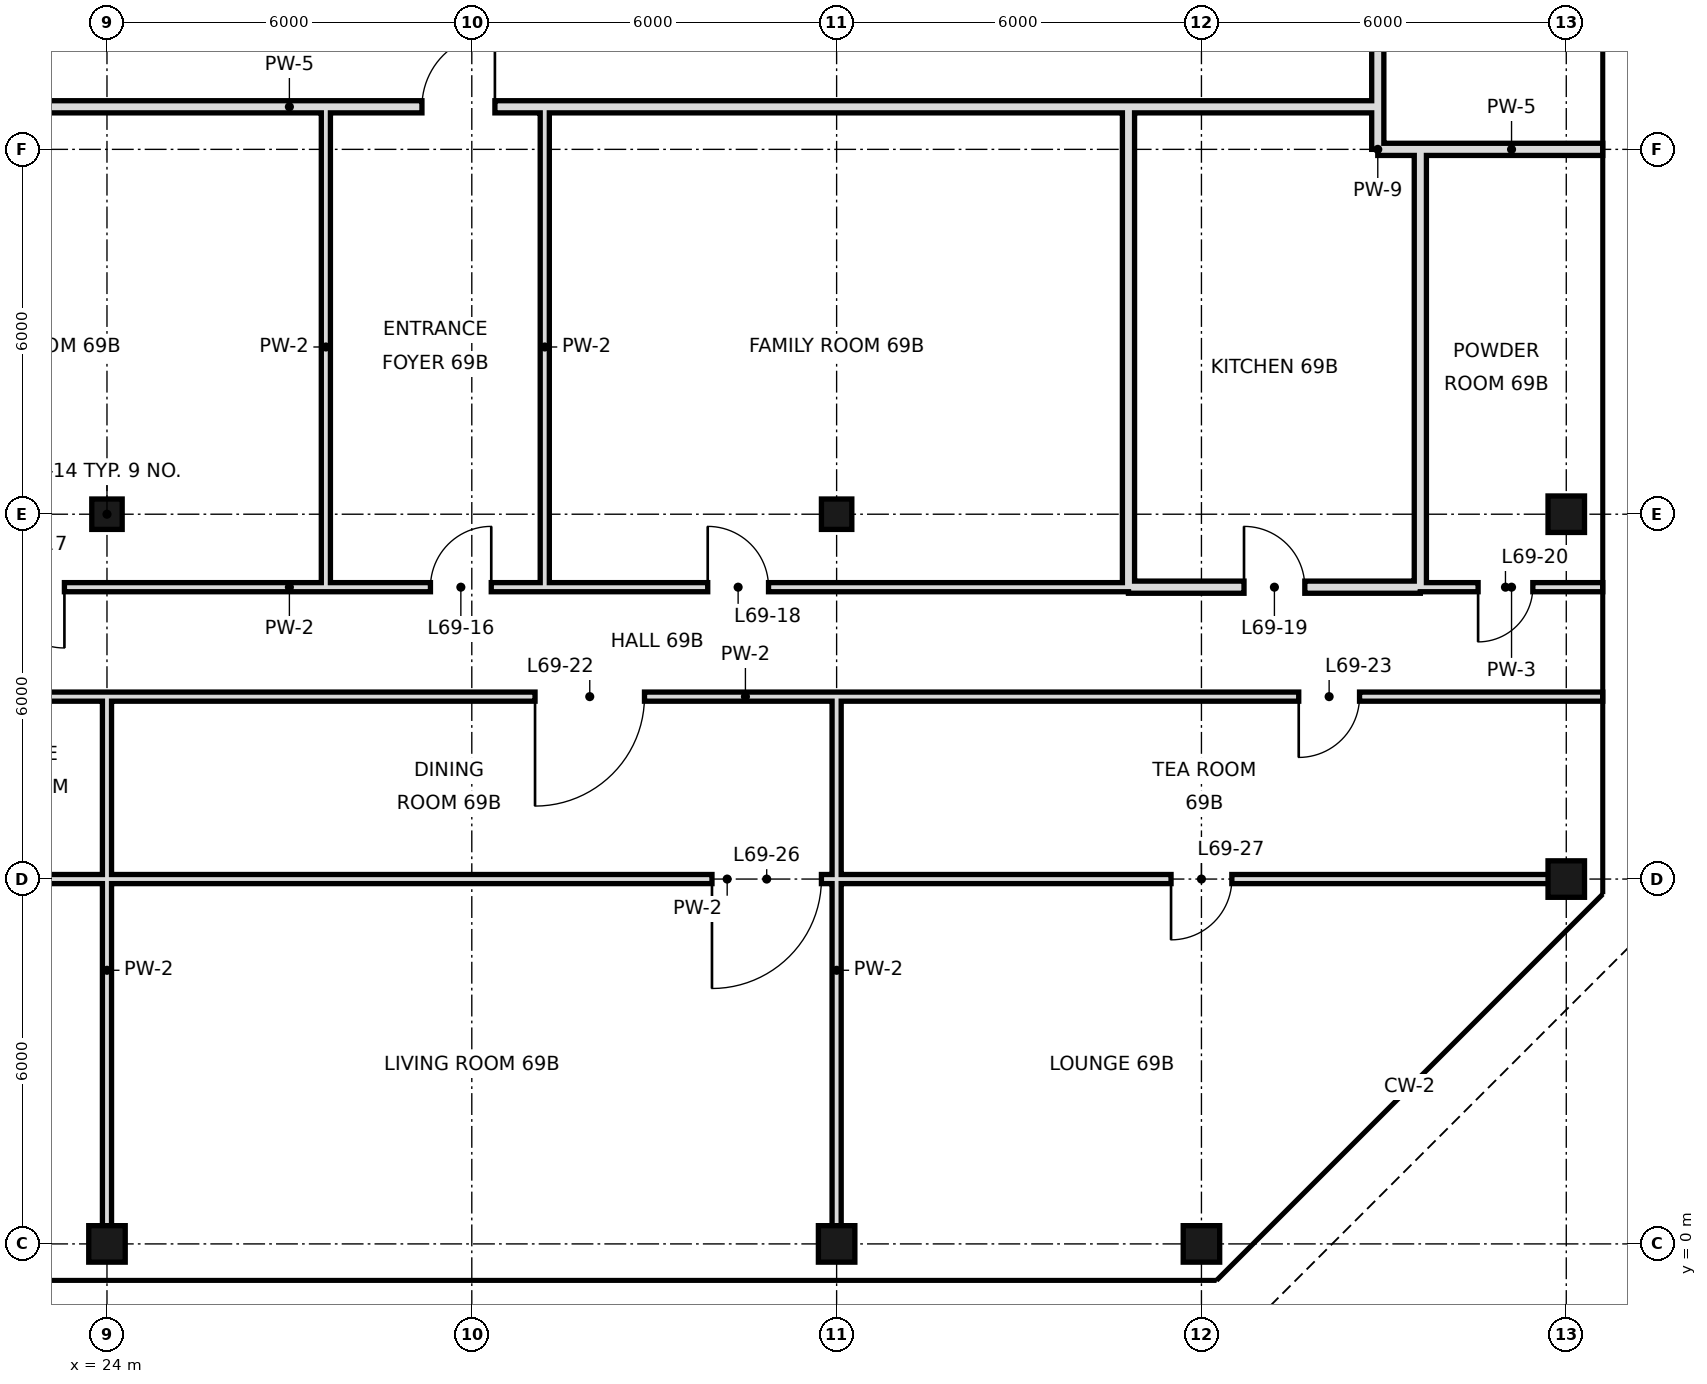
"""IFC4 building model, lengths in metres.
Left out: names, types, materials, properties, quantities, classifications, styles, units other than length and angle.
Written with IfcOpenShell. Run it as: python <this file> out.ifc"""

import sys

from ifc_helpers import new_model, si_unit, direction, frame, frame_2d, origin, origin_2d, place, context, subcontext, project, spatial, rectangle, hollow_rectangle, extrude, element, fill, save


model = new_model("IFC4")
c1 = context("Model", 3, precision=1e-05, world=origin(), true_north=direction((0.0, 1.0)))
c2 = subcontext(c1, "Body", "Model", "MODEL_VIEW")
j1 = project(units=[si_unit("LENGTHUNIT", "METRE"), si_unit("PLANEANGLEUNIT", "RADIAN")], contexts=[c1])
p1 = place(None, origin())
s1 = spatial("IfcSite", under=j1, at=p1, CompositionType="ELEMENT")
p2 = place(p1, origin())
s2 = spatial("IfcBuilding", under=s1, at=p2, CompositionType="ELEMENT")
p3 = place(p2, frame((0.0, 0.0, 294.4)))
s3 = spatial("IfcBuildingStorey", under=s2, at=p3, CompositionType="ELEMENT", Elevation=294.4)
p4 = place(p3, frame((24.0, 0.0, 0.0), z_axis=(0.0, 0.0, 1.0), x_axis=(1.0, 0.0, 0.0)))
e1 = element("IfcColumn", 1, at=p4, inside=s3, PredefinedType="COLUMN", context=c2, shape_type="SweptSolid", body=[
    extrude(hollow_rectangle(XDim=0.6, YDim=0.6, WallThickness=0.028, at=origin_2d()), origin(), (0.0, 0.0, 1.0), 3.6),
])
p5 = place(p3, frame((24.0, 12.0, 0.0), z_axis=(0.0, 0.0, 1.0), x_axis=(1.0, 0.0, 0.0)))
e2 = element("IfcColumn", 2, at=p5, inside=s3, PredefinedType="COLUMN", context=c2, shape_type="SweptSolid", body=[
    extrude(hollow_rectangle(XDim=0.5, YDim=0.5, WallThickness=0.025, at=origin_2d()), origin(), (0.0, 0.0, 1.0), 3.6),
])
p6 = place(p3, frame((36.0, 0.0, 0.0), z_axis=(0.0, 0.0, 1.0), x_axis=(1.0, 0.0, 0.0)))
e3 = element("IfcColumn", 3, at=p6, inside=s3, PredefinedType="COLUMN", context=c2, shape_type="SweptSolid", body=[
    extrude(hollow_rectangle(XDim=0.6, YDim=0.6, WallThickness=0.028, at=origin_2d()), origin(), (0.0, 0.0, 1.0), 3.6),
])
p7 = place(p3, frame((36.0, 12.0, 0.0), z_axis=(0.0, 0.0, 1.0), x_axis=(1.0, 0.0, 0.0)))
e4 = element("IfcColumn", 4, at=p7, inside=s3, PredefinedType="COLUMN", context=c2, shape_type="SweptSolid", body=[
    extrude(hollow_rectangle(XDim=0.5, YDim=0.5, WallThickness=0.025, at=origin_2d()), origin(), (0.0, 0.0, 1.0), 3.6),
])
for number, where, z_axis, x_axis in (
    (5, (42.0, 0.0, 0.0), (0.0, 0.0, 1.0), (1.0, 0.0, 0.0)),
    (6, (48.0, 6.0, 0.0), (0.0, 0.0, 1.0), (1.0, 0.0, 0.0)),
    (7, (48.0, 12.0, 0.0), (0.0, 0.0, 1.0), (1.0, 0.0, 0.0)),
):
    element("IfcColumn", number, at=place(p3, frame(where, z_axis=z_axis, x_axis=x_axis)), inside=s3, PredefinedType="COLUMN", context=c2, shape_type="SweptSolid", body=[
        extrude(hollow_rectangle(XDim=0.6, YDim=0.6, WallThickness=0.028, at=origin_2d()), origin(), (0.0, 0.0, 1.0), 3.6),
    ])
p8 = place(p3, frame((24.0, 0.0, 0.0), z_axis=(0.0, 0.0, 1.0), x_axis=(0.0, 1.0, 0.0)))
e8 = element("IfcWall", 8, at=p8, inside=s3, PredefinedType="PARTITIONING", context=c2, shape_type="SweptSolid", body=[
    extrude(rectangle(XDim=9.0, YDim=0.15, at=frame_2d((4.5, 0.0))), origin(), (0.0, 0.0, 1.0), 2.72),
])
for number, where, z_axis, x_axis in (
    (9, (27.6, 10.8, 0.0), (0.0, 0.0, 1.0), (0.0, 1.0, 0.0)),
    (10, (31.2, 10.8, 0.0), (0.0, 0.0, 1.0), (0.0, 1.0, 0.0)),
):
    element("IfcWall", number, at=place(p3, frame(where, z_axis=z_axis, x_axis=x_axis)), inside=s3, PredefinedType="PARTITIONING", context=c2, shape_type="SweptSolid", body=[
        extrude(rectangle(XDim=7.9, YDim=0.15, at=frame_2d((3.95, 0.0))), origin(), (0.0, 0.0, 1.0), 3.42),
    ])
p9 = place(p3, frame((36.0, 0.0, 0.0), z_axis=(0.0, 0.0, 1.0), x_axis=(0.0, 1.0, 0.0)))
e11 = element("IfcWall", 11, at=p9, inside=s3, PredefinedType="PARTITIONING", context=c2, shape_type="SweptSolid", body=[
    extrude(rectangle(XDim=9.0, YDim=0.15, at=frame_2d((4.5, 0.0))), origin(), (0.0, 0.0, 1.0), 2.72),
])
p10 = place(p3, frame((40.8, 10.8, 0.0), z_axis=(0.0, 0.0, 1.0), x_axis=(0.0, 1.0, 0.0)))
e12 = element("IfcWall", 12, at=p10, inside=s3, PredefinedType="SOLIDWALL", context=c2, shape_type="SweptSolid", body=[
    extrude(rectangle(XDim=7.9, YDim=0.2, at=frame_2d((3.95, 0.0))), origin(), (0.0, 0.0, 1.0), 2.72),
])
p11 = place(p3, frame((44.9, 18.7, 0.0), z_axis=(0.0, 0.0, 1.0), x_axis=(0.0, 1.0, 0.0)))
e13 = element("IfcWall", 13, at=p11, inside=s3, PredefinedType="SOLIDWALL", context=c2, shape_type="SweptSolid", body=[
    extrude(rectangle(XDim=27.249, YDim=0.2, at=frame_2d((13.625, 0.0))), origin(), (0.0, 0.0, 1.0), 2.97),
])
p12 = place(p11, frame((17.54, 0.0, 0.0)))
e14 = element("IfcOpeningElement", 14, at=p12, cuts=e13, PredefinedType="OPENING", context=c2, shape_type="SweptSolid", body=[
    extrude(rectangle(XDim=1.2, YDim=2.4, at=frame_2d((0.6, 1.2))), frame((0.0, 0.11, 0.0), z_axis=(0.0, -1.0, 0.0), x_axis=(1.0, 0.0, 0.0)), (0.0, 0.0, 1.0), 0.22),
])
p13 = place(p3, frame((44.9, 18.0, 0.0), z_axis=(0.0, 0.0, 1.0), x_axis=(0.0, 1.0, 0.0)))
e15 = element("IfcWall", 15, at=p13, inside=s3, PredefinedType="SOLIDWALL", context=c2, shape_type="SweptSolid", body=[
    extrude(rectangle(XDim=0.7, YDim=0.2, at=frame_2d((0.35, 0.0))), origin(), (0.0, 0.0, 1.0), 2.97),
])
p14 = place(p3, frame((45.6, 10.8, 0.0), z_axis=(0.0, 0.0, 1.0), x_axis=(0.0, 1.0, 0.0)))
e16 = element("IfcWall", 16, at=p14, inside=s3, PredefinedType="SOLIDWALL", context=c2, shape_type="SweptSolid", body=[
    extrude(rectangle(XDim=7.2, YDim=0.2, at=frame_2d((3.6, 0.0))), origin(), (0.0, 0.0, 1.0), 2.72),
])
p15 = place(p3, frame((40.8, 10.8, 0.0), z_axis=(0.0, 0.0, 1.0), x_axis=(1.0, 0.0, 0.0)))
e17 = element("IfcWall", 17, at=p15, inside=s3, PredefinedType="SOLIDWALL", context=c2, shape_type="SweptSolid", body=[
    extrude(rectangle(XDim=4.8, YDim=0.2, at=frame_2d((2.4, 0.0))), origin(), (0.0, 0.0, 1.0), 2.72),
])
p16 = place(p15, frame((1.9, 0.0, 0.0)))
e18 = element("IfcOpeningElement", 18, at=p16, cuts=e17, PredefinedType="OPENING", context=c2, shape_type="SweptSolid", body=[
    extrude(rectangle(XDim=1.0, YDim=2.4, at=frame_2d((0.5, 1.2))), frame((0.0, 0.11, 0.0), z_axis=(0.0, -1.0, 0.0), x_axis=(1.0, 0.0, 0.0)), (0.0, 0.0, 1.0), 0.22),
])
p17 = place(p3, frame((13.2, 10.8, 0.0), z_axis=(0.0, 0.0, 1.0), x_axis=(1.0, 0.0, 0.0)))
e19 = element("IfcWall", 19, at=p17, inside=s3, PredefinedType="PARTITIONING", context=c2, shape_type="SweptSolid", body=[
    extrude(rectangle(XDim=27.6, YDim=0.15, at=frame_2d((13.8, 0.0))), origin(), (0.0, 0.0, 1.0), 3.42),
])
p18 = place(p17, frame((2.56, 0.0, 0.0)))
e20 = element("IfcOpeningElement", 20, at=p18, cuts=e19, PredefinedType="OPENING", context=c2, shape_type="SweptSolid", body=[
    extrude(rectangle(XDim=1.0, YDim=2.4, at=frame_2d((0.5, 1.2))), frame((0.0, 0.085, 0.0), z_axis=(0.0, -1.0, 0.0), x_axis=(1.0, 0.0, 0.0)), (0.0, 0.0, 1.0), 0.17),
])
p19 = place(p17, frame((16.12, 0.0, 0.0)))
e21 = element("IfcOpeningElement", 21, at=p19, cuts=e19, PredefinedType="OPENING", context=c2, shape_type="SweptSolid", body=[
    extrude(rectangle(XDim=1.0, YDim=2.4, at=frame_2d((0.5, 1.2))), frame((0.0, 0.085, 0.0), z_axis=(0.0, -1.0, 0.0), x_axis=(1.0, 0.0, 0.0)), (0.0, 0.0, 1.0), 0.17),
])
p20 = place(p17, frame((9.1, 0.0, 0.0)))
e22 = element("IfcOpeningElement", 22, at=p20, cuts=e19, PredefinedType="OPENING", context=c2, shape_type="SweptSolid", body=[
    extrude(rectangle(XDim=1.0, YDim=2.4, at=frame_2d((0.5, 1.2))), frame((0.0, 0.085, 0.0), z_axis=(0.0, -1.0, 0.0), x_axis=(1.0, 0.0, 0.0)), (0.0, 0.0, 1.0), 0.17),
])
p21 = place(p17, frame((20.68, 0.0, 0.0)))
e23 = element("IfcOpeningElement", 23, at=p21, cuts=e19, PredefinedType="OPENING", context=c2, shape_type="SweptSolid", body=[
    extrude(rectangle(XDim=1.0, YDim=2.4, at=frame_2d((0.5, 1.2))), frame((0.0, 0.085, 0.0), z_axis=(0.0, -1.0, 0.0), x_axis=(1.0, 0.0, 0.0)), (0.0, 0.0, 1.0), 0.17),
])
p22 = place(p3, frame((45.6, 10.8, 0.0), z_axis=(0.0, 0.0, 1.0), x_axis=(1.0, 0.0, 0.0)))
e24 = element("IfcWall", 24, at=p22, inside=s3, PredefinedType="PARTITIONING", context=c2, shape_type="SweptSolid", body=[
    extrude(rectangle(XDim=3.0, YDim=0.15, at=frame_2d((1.5, 0.0))), origin(), (0.0, 0.0, 1.0), 3.42),
])
p23 = place(p22, frame((0.95, 0.0, 0.0)))
e25 = element("IfcOpeningElement", 25, at=p23, cuts=e24, PredefinedType="OPENING", context=c2, shape_type="SweptSolid", body=[
    extrude(rectangle(XDim=0.9, YDim=2.4, at=frame_2d((0.45, 1.2))), frame((0.0, 0.085, 0.0), z_axis=(0.0, -1.0, 0.0), x_axis=(1.0, 0.0, 0.0)), (0.0, 0.0, 1.0), 0.17),
])
p24 = place(p3, frame((45.6, 18.0, 0.0), z_axis=(0.0, 0.0, 1.0), x_axis=(1.0, 0.0, 0.0)))
e26 = element("IfcWall", 26, at=p24, inside=s3, PredefinedType="SOLIDWALL", context=c2, shape_type="SweptSolid", body=[
    extrude(rectangle(XDim=3.0, YDim=0.2, at=frame_2d((1.5, 0.0))), origin(), (0.0, 0.0, 1.0), 2.72),
])
p25 = place(p3, frame((44.9, 18.0, 0.0), z_axis=(0.0, 0.0, 1.0), x_axis=(1.0, 0.0, 0.0)))
e27 = element("IfcWall", 27, at=p25, inside=s3, PredefinedType="SOLIDWALL", context=c2, shape_type="SweptSolid", body=[
    extrude(rectangle(XDim=0.7, YDim=0.2, at=frame_2d((0.35, 0.0))), origin(), (0.0, 0.0, 1.0), 2.97),
])
p26 = place(p3, frame((13.2, 18.7, 0.0), z_axis=(0.0, 0.0, 1.0), x_axis=(1.0, 0.0, 0.0)))
e28 = element("IfcWall", 28, at=p26, inside=s3, PredefinedType="SOLIDWALL", context=c2, shape_type="SweptSolid", body=[
    extrude(rectangle(XDim=27.6, YDim=0.2, at=frame_2d((13.8, 0.0))), origin(), (0.0, 0.0, 1.0), 2.72),
])
p27 = place(p26, frame((1.8, 0.0, 0.0)))
e29 = element("IfcOpeningElement", 29, at=p27, cuts=e28, PredefinedType="OPENING", context=c2, shape_type="SweptSolid", body=[
    extrude(rectangle(XDim=1.2, YDim=2.4, at=frame_2d((0.6, 1.2))), frame((0.0, 0.11, 0.0), z_axis=(0.0, -1.0, 0.0), x_axis=(1.0, 0.0, 0.0)), (0.0, 0.0, 1.0), 0.22),
])
p28 = place(p26, frame((15.98, 0.0, 0.0)))
e30 = element("IfcOpeningElement", 30, at=p28, cuts=e28, PredefinedType="OPENING", context=c2, shape_type="SweptSolid", body=[
    extrude(rectangle(XDim=1.2, YDim=2.4, at=frame_2d((0.6, 1.2))), frame((0.0, 0.11, 0.0), z_axis=(0.0, -1.0, 0.0), x_axis=(1.0, 0.0, 0.0)), (0.0, 0.0, 1.0), 0.22),
])
p29 = place(p3, frame((40.8, 18.7, 0.0), z_axis=(0.0, 0.0, 1.0), x_axis=(1.0, 0.0, 0.0)))
e31 = element("IfcWall", 31, at=p29, inside=s3, PredefinedType="SOLIDWALL", context=c2, shape_type="SweptSolid", body=[
    extrude(rectangle(XDim=4.1, YDim=0.2, at=frame_2d((2.05, 0.0))), origin(), (0.0, 0.0, 1.0), 2.72),
])
p30 = place(p3, frame((20.4, 6.0, 0.0), z_axis=(0.0, 0.0, 1.0), x_axis=(1.0, 0.0, 0.0)))
e32 = element("IfcWall", 32, at=p30, inside=s3, PredefinedType="PARTITIONING", context=c2, shape_type="SweptSolid", body=[
    extrude(rectangle(XDim=27.6, YDim=0.15, at=frame_2d((13.8, 0.0))), origin(), (0.0, 0.0, 1.0), 2.72),
])
p31 = place(p30, frame((0.25, 0.0, 0.0)))
e33 = element("IfcOpeningElement", 33, at=p31, cuts=e32, PredefinedType="OPENING", context=c2, shape_type="SweptSolid", body=[
    extrude(rectangle(XDim=1.0, YDim=2.4, at=frame_2d((0.5, 1.2))), frame((0.0, 0.085, 0.0), z_axis=(0.0, -1.0, 0.0), x_axis=(1.0, 0.0, 0.0)), (0.0, 0.0, 1.0), 0.17),
])
p32 = place(p30, frame((13.55, 0.0, 0.0)))
e34 = element("IfcOpeningElement", 34, at=p32, cuts=e32, PredefinedType="OPENING", context=c2, shape_type="SweptSolid", body=[
    extrude(rectangle(XDim=1.8, YDim=2.4, at=frame_2d((0.9, 1.2))), frame((0.0, 0.085, 0.0), z_axis=(0.0, -1.0, 0.0), x_axis=(1.0, 0.0, 0.0)), (0.0, 0.0, 1.0), 0.17),
])
p33 = place(p30, frame((21.1, 0.0, 0.0)))
e35 = element("IfcOpeningElement", 35, at=p33, cuts=e32, PredefinedType="OPENING", context=c2, shape_type="SweptSolid", body=[
    extrude(rectangle(XDim=1.0, YDim=2.4, at=frame_2d((0.5, 1.2))), frame((0.0, 0.085, 0.0), z_axis=(0.0, -1.0, 0.0), x_axis=(1.0, 0.0, 0.0)), (0.0, 0.0, 1.0), 0.17),
])
p34 = place(p3, frame((20.4, 9.0, 0.0), z_axis=(0.0, 0.0, 1.0), x_axis=(1.0, 0.0, 0.0)))
e36 = element("IfcWall", 36, at=p34, inside=s3, PredefinedType="PARTITIONING", context=c2, shape_type="SweptSolid", body=[
    extrude(rectangle(XDim=28.2, YDim=0.15, at=frame_2d((14.1, 0.0))), origin(), (0.0, 0.0, 1.0), 3.42),
])
p35 = place(p34, frame((1.3, 0.0, 0.0)))
e37 = element("IfcOpeningElement", 37, at=p35, cuts=e36, PredefinedType="OPENING", context=c2, shape_type="SweptSolid", body=[
    extrude(rectangle(XDim=1.0, YDim=2.4, at=frame_2d((0.5, 1.2))), frame((0.0, 0.085, 0.0), z_axis=(0.0, -1.0, 0.0), x_axis=(1.0, 0.0, 0.0)), (0.0, 0.0, 1.0), 0.17),
])
p36 = place(p34, frame((10.64, 0.0, 0.0)))
e38 = element("IfcOpeningElement", 38, at=p36, cuts=e36, PredefinedType="OPENING", context=c2, shape_type="SweptSolid", body=[
    extrude(rectangle(XDim=1.8, YDim=2.4, at=frame_2d((0.9, 1.2))), frame((0.0, 0.085, 0.0), z_axis=(0.0, -1.0, 0.0), x_axis=(1.0, 0.0, 0.0)), (0.0, 0.0, 1.0), 0.17),
])
p37 = place(p34, frame((23.2, 0.0, 0.0)))
e39 = element("IfcOpeningElement", 39, at=p37, cuts=e36, PredefinedType="OPENING", context=c2, shape_type="SweptSolid", body=[
    extrude(rectangle(XDim=1.0, YDim=2.4, at=frame_2d((0.5, 1.2))), frame((0.0, 0.085, 0.0), z_axis=(0.0, -1.0, 0.0), x_axis=(1.0, 0.0, 0.0)), (0.0, 0.0, 1.0), 0.17),
])
p38 = place(p19, frame((1.0, 0.0, 0.0), z_axis=(0.0, 0.0, 1.0), x_axis=(-1.0, 0.0, 0.0)))
e40 = element("IfcDoor", 40, at=p38, inside=s3, OperationType="SINGLE_SWING_LEFT", PredefinedType="DOOR", context=c2, shape_type="SweptSolid", body=[
    extrude(rectangle(XDim=1.0, YDim=2.4, at=frame_2d((0.5, 1.2))), frame((0.0, 0.025, 0.0), z_axis=(0.0, -1.0, 0.0), x_axis=(1.0, 0.0, 0.0)), (0.0, 0.0, 1.0), 0.05),
])
fill(e21, e40)
p39 = place(p20, origin())
e41 = element("IfcDoor", 41, at=p39, inside=s3, OperationType="SINGLE_SWING_RIGHT", PredefinedType="DOOR", context=c2, shape_type="SweptSolid", body=[
    extrude(rectangle(XDim=1.0, YDim=2.4, at=frame_2d((0.5, 1.2))), frame((0.0, 0.025, 0.0), z_axis=(0.0, -1.0, 0.0), x_axis=(1.0, 0.0, 0.0)), (0.0, 0.0, 1.0), 0.05),
])
fill(e22, e41)
p40 = place(p21, origin())
e42 = element("IfcDoor", 42, at=p40, inside=s3, OperationType="SINGLE_SWING_LEFT", PredefinedType="DOOR", context=c2, shape_type="SweptSolid", body=[
    extrude(rectangle(XDim=1.0, YDim=2.4, at=frame_2d((0.5, 1.2))), frame((0.0, 0.025, 0.0), z_axis=(0.0, -1.0, 0.0), x_axis=(1.0, 0.0, 0.0)), (0.0, 0.0, 1.0), 0.05),
])
fill(e23, e42)
p41 = place(p16, origin())
e43 = element("IfcDoor", 43, at=p41, inside=s3, OperationType="SINGLE_SWING_LEFT", PredefinedType="DOOR", context=c2, shape_type="SweptSolid", body=[
    extrude(rectangle(XDim=1.0, YDim=2.4, at=frame_2d((0.5, 1.2))), frame((0.0, 0.025, 0.0), z_axis=(0.0, -1.0, 0.0), x_axis=(1.0, 0.0, 0.0)), (0.0, 0.0, 1.0), 0.05),
])
fill(e18, e43)
p42 = place(p23, frame((0.9, 0.0, 0.0), z_axis=(0.0, 0.0, 1.0), x_axis=(-1.0, 0.0, 0.0)))
e44 = element("IfcDoor", 44, at=p42, inside=s3, OperationType="SINGLE_SWING_RIGHT", PredefinedType="DOOR", context=c2, shape_type="SweptSolid", body=[
    extrude(rectangle(XDim=0.9, YDim=2.4, at=frame_2d((0.45, 1.2))), frame((0.0, 0.025, 0.0), z_axis=(0.0, -1.0, 0.0), x_axis=(1.0, 0.0, 0.0)), (0.0, 0.0, 1.0), 0.05),
])
fill(e25, e44)
p43 = place(p36, frame((1.8, 0.0, 0.0), z_axis=(0.0, 0.0, 1.0), x_axis=(-1.0, 0.0, 0.0)))
e45 = element("IfcDoor", 45, at=p43, inside=s3, OperationType="SINGLE_SWING_RIGHT", PredefinedType="DOOR", context=c2, shape_type="SweptSolid", body=[
    extrude(rectangle(XDim=1.8, YDim=2.4, at=frame_2d((0.9, 1.2))), frame((0.0, 0.025, 0.0), z_axis=(0.0, -1.0, 0.0), x_axis=(1.0, 0.0, 0.0)), (0.0, 0.0, 1.0), 0.05),
])
fill(e38, e45)
p44 = place(p37, frame((1.0, 0.0, 0.0), z_axis=(0.0, 0.0, 1.0), x_axis=(-1.0, 0.0, 0.0)))
e46 = element("IfcDoor", 46, at=p44, inside=s3, OperationType="SINGLE_SWING_RIGHT", PredefinedType="DOOR", context=c2, shape_type="SweptSolid", body=[
    extrude(rectangle(XDim=1.0, YDim=2.4, at=frame_2d((0.5, 1.2))), frame((0.0, 0.025, 0.0), z_axis=(0.0, -1.0, 0.0), x_axis=(1.0, 0.0, 0.0)), (0.0, 0.0, 1.0), 0.05),
])
fill(e39, e46)
p45 = place(p32, frame((1.8, 0.0, 0.0), z_axis=(0.0, 0.0, 1.0), x_axis=(-1.0, 0.0, 0.0)))
e47 = element("IfcDoor", 47, at=p45, inside=s3, OperationType="SINGLE_SWING_RIGHT", PredefinedType="DOOR", context=c2, shape_type="SweptSolid", body=[
    extrude(rectangle(XDim=1.8, YDim=2.4, at=frame_2d((0.9, 1.2))), frame((0.0, 0.025, 0.0), z_axis=(0.0, -1.0, 0.0), x_axis=(1.0, 0.0, 0.0)), (0.0, 0.0, 1.0), 0.05),
])
fill(e34, e47)
p46 = place(p33, frame((1.0, 0.0, 0.0), z_axis=(0.0, 0.0, 1.0), x_axis=(-1.0, 0.0, 0.0)))
e48 = element("IfcDoor", 48, at=p46, inside=s3, OperationType="SINGLE_SWING_RIGHT", PredefinedType="DOOR", context=c2, shape_type="SweptSolid", body=[
    extrude(rectangle(XDim=1.0, YDim=2.4, at=frame_2d((0.5, 1.2))), frame((0.0, 0.025, 0.0), z_axis=(0.0, -1.0, 0.0), x_axis=(1.0, 0.0, 0.0)), (0.0, 0.0, 1.0), 0.05),
])
fill(e35, e48)
p47 = place(p28, frame((1.2, 0.0, 0.0), z_axis=(0.0, 0.0, 1.0), x_axis=(-1.0, 0.0, 0.0)))
e49 = element("IfcDoor", 49, at=p47, inside=s3, OperationType="SINGLE_SWING_LEFT", PredefinedType="DOOR", context=c2, shape_type="SweptSolid", body=[
    extrude(rectangle(XDim=1.2, YDim=2.4, at=frame_2d((0.6, 1.2))), frame((0.0, 0.025, 0.0), z_axis=(0.0, -1.0, 0.0), x_axis=(1.0, 0.0, 0.0)), (0.0, 0.0, 1.0), 0.05),
])
fill(e30, e49)
save(model, sys.argv[1])
